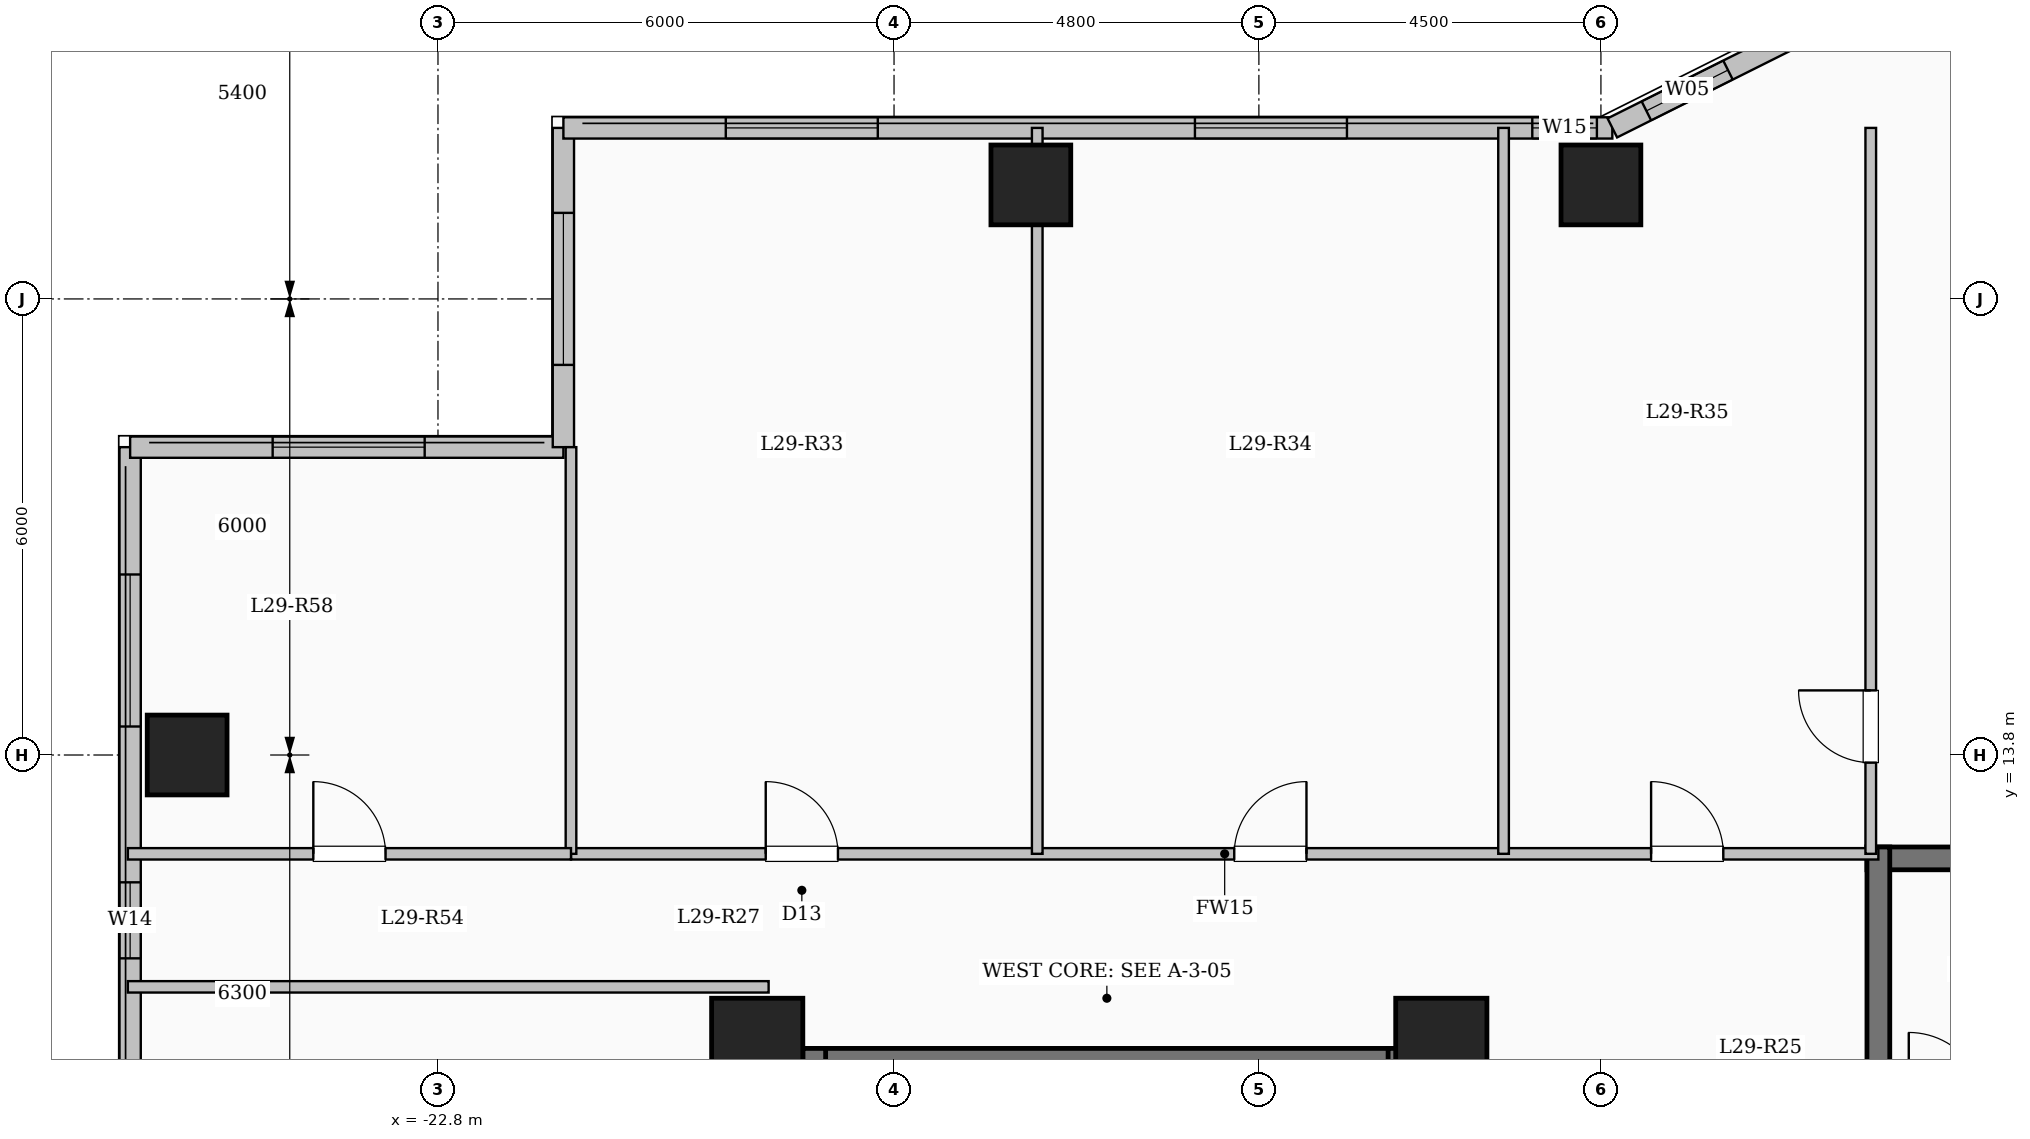
"""IFC4 building model, lengths in metres.
Left out: names, types, materials, properties, quantities, classifications, styles, units other than length and angle.
Written with IfcOpenShell. Run it as: python <this file> out.ifc"""

import sys

from ifc_helpers import new_model, si_unit, direction, frame, frame_2d, origin, origin_2d, place, context, subcontext, project, spatial, rectangle, extrude, element, fill, save


model = new_model("IFC4")
c1 = context("Model", 3, precision=1e-05, world=origin(), true_north=direction((0.0, 1.0)))
c2 = subcontext(c1, "Body", "Model", "MODEL_VIEW")
j1 = project(units=[si_unit("LENGTHUNIT", "METRE"), si_unit("PLANEANGLEUNIT", "RADIAN")], contexts=[c1])
p1 = place(None, origin())
s1 = spatial("IfcSite", under=j1, at=p1, CompositionType="ELEMENT")
p2 = place(p1, origin())
s2 = spatial("IfcBuilding", under=s1, at=p2, CompositionType="ELEMENT")
p3 = place(p2, frame((0.0, 0.0, 108.45)))
s3 = spatial("IfcBuildingStorey", under=s2, at=p3, CompositionType="ELEMENT", Elevation=108.45)
for number, where, z_axis, x_axis in (
    (1, (-9.6, 10.0, 0.0), (0.0, 0.0, 1.0), (1.0, 0.0, 0.0)),
    (2, (-18.6, 10.0, 0.0), (0.0, 0.0, 1.0), (1.0, 0.0, 0.0)),
):
    element("IfcColumn", number, at=place(p3, frame(where, z_axis=z_axis, x_axis=x_axis)), inside=s3, PredefinedType="COLUMN", context=c2, shape_type="SweptSolid", body=[
        extrude(rectangle(XDim=1.2, YDim=1.2, at=origin_2d()), origin(), (0.0, 0.0, 1.0), 3.35),
    ])
for number, where, z_axis, x_axis in (
    (3, (-15.0, 21.3, 0.0), (0.0, 0.0, 1.0), (1.0, 0.0, 0.0)),
    (4, (-7.5, 21.3, 0.0), (0.0, 0.0, 1.0), (1.0, 0.0, 0.0)),
    (5, (-26.1, 13.8, 0.0), (0.0, 0.0, 1.0), (1.0, 0.0, 0.0)),
):
    element("IfcColumn", number, at=place(p3, frame(where, z_axis=z_axis, x_axis=x_axis)), inside=s3, PredefinedType="COLUMN", context=c2, shape_type="SweptSolid", body=[
        extrude(rectangle(XDim=1.05, YDim=1.05, at=origin_2d()), origin(), (0.0, 0.0, 1.0), 3.35),
    ])
p4 = place(p3, frame((-26.85, -17.85, 0.0), z_axis=(0.0, 0.0, 1.0), x_axis=(0.0, 1.0, 0.0)))
e6 = element("IfcWall", 6, at=p4, inside=s3, PredefinedType="SOLIDWALL", context=c2, shape_type="SweptSolid", body=[
    extrude(rectangle(XDim=35.7, YDim=0.28, at=frame_2d((17.85, 0.0))), origin(), (0.0, 0.0, 1.0), 3.1),
])
p5 = place(p4, frame((2.55, 0.0, 0.9)))
e7 = element("IfcOpeningElement", 7, at=p5, cuts=e6, PredefinedType="OPENING", context=c2, shape_type="SweptSolid", body=[
    extrude(rectangle(XDim=2.4, YDim=1.8, at=frame_2d((1.2, 0.9))), frame((0.0, 0.15, 0.0), z_axis=(0.0, -1.0, 0.0), x_axis=(1.0, 0.0, 0.0)), (0.0, 0.0, 1.0), 0.3),
])
p6 = place(p4, frame((8.343, 0.0, 0.9)))
e8 = element("IfcOpeningElement", 8, at=p6, cuts=e6, PredefinedType="OPENING", context=c2, shape_type="SweptSolid", body=[
    extrude(rectangle(XDim=1.5, YDim=1.65, at=frame_2d((0.75, 0.825))), frame((0.0, 0.15, 0.0), z_axis=(0.0, -1.0, 0.0), x_axis=(1.0, 0.0, 0.0)), (0.0, 0.0, 1.0), 0.3),
])
p7 = place(p4, frame((13.75, 0.0, 0.9)))
e9 = element("IfcOpeningElement", 9, at=p7, cuts=e6, PredefinedType="OPENING", context=c2, shape_type="SweptSolid", body=[
    extrude(rectangle(XDim=2.4, YDim=1.8, at=frame_2d((1.2, 0.9))), frame((0.0, 0.15, 0.0), z_axis=(0.0, -1.0, 0.0), x_axis=(1.0, 0.0, 0.0)), (0.0, 0.0, 1.0), 0.3),
])
p8 = place(p4, frame((20.175, 0.0, 0.9)))
e10 = element("IfcOpeningElement", 10, at=p8, cuts=e6, PredefinedType="OPENING", context=c2, shape_type="SweptSolid", body=[
    extrude(rectangle(XDim=1.8, YDim=1.65, at=frame_2d((0.9, 0.825))), frame((0.0, 0.15, 0.0), z_axis=(0.0, -1.0, 0.0), x_axis=(1.0, 0.0, 0.0)), (0.0, 0.0, 1.0), 0.3),
])
p9 = place(p4, frame((24.725, 0.0, 0.9)))
e11 = element("IfcOpeningElement", 11, at=p9, cuts=e6, PredefinedType="OPENING", context=c2, shape_type="SweptSolid", body=[
    extrude(rectangle(XDim=2.0, YDim=1.7, at=frame_2d((1.0, 0.85))), frame((0.0, 0.15, 0.0), z_axis=(0.0, -1.0, 0.0), x_axis=(1.0, 0.0, 0.0)), (0.0, 0.0, 1.0), 0.3),
])
p10 = place(p4, frame((28.975, 0.0, 0.95)))
e12 = element("IfcOpeningElement", 12, at=p10, cuts=e6, PredefinedType="OPENING", context=c2, shape_type="SweptSolid", body=[
    extrude(rectangle(XDim=1.0, YDim=1.5, at=frame_2d((0.5, 0.75))), frame((0.0, 0.15, 0.0), z_axis=(0.0, -1.0, 0.0), x_axis=(1.0, 0.0, 0.0)), (0.0, 0.0, 1.0), 0.3),
])
p11 = place(p4, frame((32.025, 0.0, 0.9)))
e13 = element("IfcOpeningElement", 13, at=p11, cuts=e6, PredefinedType="OPENING", context=c2, shape_type="SweptSolid", body=[
    extrude(rectangle(XDim=2.0, YDim=1.7, at=frame_2d((1.0, 0.85))), frame((0.0, 0.15, 0.0), z_axis=(0.0, -1.0, 0.0), x_axis=(1.0, 0.0, 0.0)), (0.0, 0.0, 1.0), 0.3),
])
p12 = place(p3, frame((-26.85, 17.85, 0.0), z_axis=(0.0, 0.0, 1.0), x_axis=(1.0, 0.0, 0.0)))
e14 = element("IfcWall", 14, at=p12, inside=s3, PredefinedType="SOLIDWALL", context=c2, shape_type="SweptSolid", body=[
    extrude(rectangle(XDim=5.7, YDim=0.28, at=frame_2d((2.85, 0.0))), origin(), (0.0, 0.0, 1.0), 3.1),
])
p13 = place(p12, frame((1.875, 0.0, 0.9)))
e15 = element("IfcOpeningElement", 15, at=p13, cuts=e14, PredefinedType="OPENING", context=c2, shape_type="SweptSolid", body=[
    extrude(rectangle(XDim=2.0, YDim=1.7, at=frame_2d((1.0, 0.85))), frame((0.0, 0.15, 0.0), z_axis=(0.0, -1.0, 0.0), x_axis=(1.0, 0.0, 0.0)), (0.0, 0.0, 1.0), 0.3),
])
p14 = place(p3, frame((-21.15, 17.85, 0.0), z_axis=(0.0, 0.0, 1.0), x_axis=(0.0, 1.0, 0.0)))
e16 = element("IfcWall", 16, at=p14, inside=s3, PredefinedType="SOLIDWALL", context=c2, shape_type="SweptSolid", body=[
    extrude(rectangle(XDim=4.2, YDim=0.28, at=frame_2d((2.1, 0.0))), origin(), (0.0, 0.0, 1.0), 3.1),
])
p15 = place(p14, frame((1.082, 0.0, 0.9)))
e17 = element("IfcOpeningElement", 17, at=p15, cuts=e16, PredefinedType="OPENING", context=c2, shape_type="SweptSolid", body=[
    extrude(rectangle(XDim=2.0, YDim=1.7, at=frame_2d((1.0, 0.85))), frame((0.0, 0.15, 0.0), z_axis=(0.0, -1.0, 0.0), x_axis=(1.0, 0.0, 0.0)), (0.0, 0.0, 1.0), 0.3),
])
p16 = place(p3, frame((-21.15, 22.05, 0.0), z_axis=(0.0, 0.0, 1.0), x_axis=(1.0, 0.0, 0.0)))
e18 = element("IfcWall", 18, at=p16, inside=s3, PredefinedType="SOLIDWALL", context=c2, shape_type="SweptSolid", body=[
    extrude(rectangle(XDim=13.8, YDim=0.28, at=frame_2d((6.9, 0.0))), origin(), (0.0, 0.0, 1.0), 3.1),
])
p17 = place(p16, frame((2.136, 0.0, 0.9)))
e19 = element("IfcOpeningElement", 19, at=p17, cuts=e18, PredefinedType="OPENING", context=c2, shape_type="SweptSolid", body=[
    extrude(rectangle(XDim=2.0, YDim=1.7, at=frame_2d((1.0, 0.85))), frame((0.0, 0.15, 0.0), z_axis=(0.0, -1.0, 0.0), x_axis=(1.0, 0.0, 0.0)), (0.0, 0.0, 1.0), 0.3),
])
p18 = place(p16, frame((8.309, 0.0, 0.9)))
e20 = element("IfcOpeningElement", 20, at=p18, cuts=e18, PredefinedType="OPENING", context=c2, shape_type="SweptSolid", body=[
    extrude(rectangle(XDim=2.0, YDim=1.7, at=frame_2d((1.0, 0.85))), frame((0.0, 0.15, 0.0), z_axis=(0.0, -1.0, 0.0), x_axis=(1.0, 0.0, 0.0)), (0.0, 0.0, 1.0), 0.3),
])
p19 = place(p16, frame((12.747, 0.0, 0.95)))
e21 = element("IfcOpeningElement", 21, at=p19, cuts=e18, PredefinedType="OPENING", context=c2, shape_type="SweptSolid", body=[
    extrude(rectangle(XDim=0.85, YDim=1.5, at=frame_2d((0.425, 0.75))), frame((0.0, 0.15, 0.0), z_axis=(0.0, -1.0, 0.0), x_axis=(1.0, 0.0, 0.0)), (0.0, 0.0, 1.0), 0.3),
])
p20 = place(p3, frame((-7.35, 22.05, 0.0), z_axis=(0.0, 0.0, 1.0), x_axis=(0.894427191, 0.4472135955, 0.0)))
e22 = element("IfcWall", 22, at=p20, inside=s3, PredefinedType="SOLIDWALL", context=c2, shape_type="SweptSolid", body=[
    extrude(rectangle(XDim=3.354, YDim=0.28, at=frame_2d((1.677, 0.0))), origin(), (0.0, 0.0, 1.0), 3.1),
])
p21 = place(p20, frame((0.501, 0.0, 0.95)))
e23 = element("IfcOpeningElement", 23, at=p21, cuts=e22, PredefinedType="OPENING", context=c2, shape_type="SweptSolid", body=[
    extrude(rectangle(XDim=1.2, YDim=1.5, at=frame_2d((0.6, 0.75))), frame((0.0, 0.15, 0.0), z_axis=(0.0, -1.0, 0.0), x_axis=(1.0, 0.0, 0.0)), (0.0, 0.0, 1.0), 0.3),
])
p22 = place(p3, frame((-18.0, 9.79, 0.0), z_axis=(0.0, 0.0, 1.0), x_axis=(1.0, 0.0, 0.0)))
e24 = element("IfcWall", 24, at=p22, inside=s3, PredefinedType="SHEAR", context=c2, shape_type="SweptSolid", body=[
    extrude(rectangle(XDim=8.0, YDim=0.3, at=frame_2d((4.0, 0.0))), origin(), (0.0, 0.0, 1.0), 3.35),
])
for number, where, z_axis, x_axis in (
    (25, (-17.85, 6.35, 0.0), (0.0, 0.0, 1.0), (0.0, 1.0, 0.0)),
    (26, (-10.15, 6.35, 0.0), (0.0, 0.0, 1.0), (0.0, 1.0, 0.0)),
):
    element("IfcWall", number, at=place(p3, frame(where, z_axis=z_axis, x_axis=x_axis)), inside=s3, PredefinedType="SHEAR", context=c2, shape_type="SweptSolid", body=[
        extrude(rectangle(XDim=3.59, YDim=0.3, at=frame_2d((1.795, 0.0))), origin(), (0.0, 0.0, 1.0), 3.35),
    ])
p23 = place(p3, frame((-4.0, 12.44, 0.0), z_axis=(0.0, 0.0, 1.0), x_axis=(1.0, 0.0, 0.0)))
e27 = element("IfcWall", 27, at=p23, inside=s3, PredefinedType="SHEAR", context=c2, shape_type="SweptSolid", body=[
    extrude(rectangle(XDim=8.0, YDim=0.3, at=frame_2d((4.0, 0.0))), origin(), (0.0, 0.0, 1.0), 3.35),
])
p24 = place(p3, frame((-3.85, 9.0, 0.0), z_axis=(0.0, 0.0, 1.0), x_axis=(0.0, 1.0, 0.0)))
e28 = element("IfcWall", 28, at=p24, inside=s3, PredefinedType="SHEAR", context=c2, shape_type="SweptSolid", body=[
    extrude(rectangle(XDim=3.59, YDim=0.3, at=frame_2d((1.795, 0.0))), origin(), (0.0, 0.0, 1.0), 3.35),
])
p25 = place(p3, frame((-21.05, 12.5, 0.0), z_axis=(0.0, 0.0, 1.0), x_axis=(1.0, 0.0, 0.0)))
e29 = element("IfcWall", 29, at=p25, inside=s3, PredefinedType="PARTITIONING", context=c2, shape_type="SweptSolid", body=[
    extrude(rectangle(XDim=17.2, YDim=0.15, at=frame_2d((8.6, 0.0))), origin(), (0.0, 0.0, 1.0), 3.1),
])
p26 = place(p25, frame((2.562, 0.0, 0.0)))
e30 = element("IfcOpeningElement", 30, at=p26, cuts=e29, PredefinedType="OPENING", context=c2, shape_type="SweptSolid", body=[
    extrude(rectangle(XDim=0.95, YDim=2.15, at=frame_2d((0.475, 1.075))), frame((0.0, 0.085, 0.0), z_axis=(0.0, -1.0, 0.0), x_axis=(1.0, 0.0, 0.0)), (0.0, 0.0, 1.0), 0.17),
])
p27 = place(p25, frame((8.726, 0.0, 0.0)))
e31 = element("IfcOpeningElement", 31, at=p27, cuts=e29, PredefinedType="OPENING", context=c2, shape_type="SweptSolid", body=[
    extrude(rectangle(XDim=0.95, YDim=2.15, at=frame_2d((0.475, 1.075))), frame((0.0, 0.085, 0.0), z_axis=(0.0, -1.0, 0.0), x_axis=(1.0, 0.0, 0.0)), (0.0, 0.0, 1.0), 0.17),
])
p28 = place(p25, frame((14.21, 0.0, 0.0)))
e32 = element("IfcOpeningElement", 32, at=p28, cuts=e29, PredefinedType="OPENING", context=c2, shape_type="SweptSolid", body=[
    extrude(rectangle(XDim=0.95, YDim=2.15, at=frame_2d((0.475, 1.075))), frame((0.0, 0.085, 0.0), z_axis=(0.0, -1.0, 0.0), x_axis=(1.0, 0.0, 0.0)), (0.0, 0.0, 1.0), 0.17),
])
p29 = place(p3, frame((-3.95, 12.5, 0.0), z_axis=(0.0, 0.0, 1.0), x_axis=(0.0, 1.0, 0.0)))
e33 = element("IfcWall", 33, at=p29, inside=s3, PredefinedType="PARTITIONING", context=c2, shape_type="SweptSolid", body=[
    extrude(rectangle(XDim=9.55, YDim=0.14, at=frame_2d((4.775, 0.0))), origin(), (0.0, 0.0, 1.0), 3.1),
])
p30 = place(p29, frame((1.2, 0.0, 0.0)))
e34 = element("IfcOpeningElement", 34, at=p30, cuts=e33, PredefinedType="OPENING", context=c2, shape_type="SweptSolid", body=[
    extrude(rectangle(XDim=0.95, YDim=2.15, at=frame_2d((0.475, 1.075))), frame((0.0, 0.08, 0.0), z_axis=(0.0, -1.0, 0.0), x_axis=(1.0, 0.0, 0.0)), (0.0, 0.0, 1.0), 0.16),
])
p31 = place(p3, frame((-14.916, 12.5, 0.0), z_axis=(0.0, 0.0, 1.0), x_axis=(0.0, 1.0, 0.0)))
e35 = element("IfcWall", 35, at=p31, inside=s3, PredefinedType="PARTITIONING", context=c2, shape_type="SweptSolid", body=[
    extrude(rectangle(XDim=9.55, YDim=0.14, at=frame_2d((4.775, 0.0))), origin(), (0.0, 0.0, 1.0), 2.435),
])
p32 = place(p3, frame((-8.781, 12.5, 0.0), z_axis=(0.0, 0.0, 1.0), x_axis=(0.0, 1.0, 0.0)))
e36 = element("IfcWall", 36, at=p32, inside=s3, PredefinedType="PARTITIONING", context=c2, shape_type="SweptSolid", body=[
    extrude(rectangle(XDim=9.55, YDim=0.14, at=frame_2d((4.775, 0.0))), origin(), (0.0, 0.0, 1.0), 3.1),
])
p33 = place(p3, frame((-26.88, 10.75, 0.0), z_axis=(0.0, 0.0, 1.0), x_axis=(1.0, 0.0, 0.0)))
e37 = element("IfcWall", 37, at=p33, inside=s3, PredefinedType="PARTITIONING", context=c2, shape_type="SweptSolid", body=[
    extrude(rectangle(XDim=8.43, YDim=0.15, at=frame_2d((4.215, 0.0))), origin(), (0.0, 0.0, 1.0), 3.1),
])
p34 = place(p3, frame((-21.05, 12.5, 0.0), z_axis=(0.0, 0.0, 1.0), x_axis=(0.0, 1.0, 0.0)))
e38 = element("IfcWall", 38, at=p34, inside=s3, PredefinedType="PARTITIONING", context=c2, shape_type="SweptSolid", body=[
    extrude(rectangle(XDim=5.35, YDim=0.14, at=frame_2d((2.675, 0.0))), origin(), (0.0, 0.0, 1.0), 3.1),
])
p35 = place(p3, frame((-26.88, 12.5, 0.0), z_axis=(0.0, 0.0, 1.0), x_axis=(1.0, 0.0, 0.0)))
e39 = element("IfcWall", 39, at=p35, inside=s3, PredefinedType="PARTITIONING", context=c2, shape_type="SweptSolid", body=[
    extrude(rectangle(XDim=5.83, YDim=0.15, at=frame_2d((2.915, 0.0))), origin(), (0.0, 0.0, 1.0), 3.1),
])
p36 = place(p35, frame((2.44, 0.0, 0.0)))
e40 = element("IfcOpeningElement", 40, at=p36, cuts=e39, PredefinedType="OPENING", context=c2, shape_type="SweptSolid", body=[
    extrude(rectangle(XDim=0.95, YDim=2.15, at=frame_2d((0.475, 1.075))), frame((0.0, 0.085, 0.0), z_axis=(0.0, -1.0, 0.0), x_axis=(1.0, 0.0, 0.0)), (0.0, 0.0, 1.0), 0.17),
])
p37 = place(p10, origin())
e41 = element("IfcWindow", 41, at=p37, inside=s3, PartitioningType="SINGLE_PANEL", PredefinedType="WINDOW", context=c2, shape_type="SweptSolid", body=[
    extrude(rectangle(XDim=1.0, YDim=1.5, at=frame_2d((0.5, 0.75))), frame((0.0, 0.03, 0.0), z_axis=(0.0, -1.0, 0.0), x_axis=(1.0, 0.0, 0.0)), (0.0, 0.0, 1.0), 0.06),
])
fill(e12, e41)
p38 = place(p11, origin())
e42 = element("IfcWindow", 42, at=p38, inside=s3, PartitioningType="SINGLE_PANEL", PredefinedType="WINDOW", context=c2, shape_type="SweptSolid", body=[
    extrude(rectangle(XDim=2.0, YDim=1.7, at=frame_2d((1.0, 0.85))), frame((0.0, 0.03, 0.0), z_axis=(0.0, -1.0, 0.0), x_axis=(1.0, 0.0, 0.0)), (0.0, 0.0, 1.0), 0.06),
])
fill(e13, e42)
p39 = place(p13, origin())
e43 = element("IfcWindow", 43, at=p39, inside=s3, PartitioningType="SINGLE_PANEL", PredefinedType="WINDOW", context=c2, shape_type="SweptSolid", body=[
    extrude(rectangle(XDim=2.0, YDim=1.7, at=frame_2d((1.0, 0.85))), frame((0.0, 0.03, 0.0), z_axis=(0.0, -1.0, 0.0), x_axis=(1.0, 0.0, 0.0)), (0.0, 0.0, 1.0), 0.06),
])
fill(e15, e43)
p40 = place(p15, origin())
e44 = element("IfcWindow", 44, at=p40, inside=s3, PartitioningType="SINGLE_PANEL", PredefinedType="WINDOW", context=c2, shape_type="SweptSolid", body=[
    extrude(rectangle(XDim=2.0, YDim=1.7, at=frame_2d((1.0, 0.85))), frame((0.0, 0.03, 0.0), z_axis=(0.0, -1.0, 0.0), x_axis=(1.0, 0.0, 0.0)), (0.0, 0.0, 1.0), 0.06),
])
fill(e17, e44)
p41 = place(p17, origin())
e45 = element("IfcWindow", 45, at=p41, inside=s3, PartitioningType="SINGLE_PANEL", PredefinedType="WINDOW", context=c2, shape_type="SweptSolid", body=[
    extrude(rectangle(XDim=2.0, YDim=1.7, at=frame_2d((1.0, 0.85))), frame((0.0, 0.03, 0.0), z_axis=(0.0, -1.0, 0.0), x_axis=(1.0, 0.0, 0.0)), (0.0, 0.0, 1.0), 0.06),
])
fill(e19, e45)
p42 = place(p18, origin())
e46 = element("IfcWindow", 46, at=p42, inside=s3, PartitioningType="SINGLE_PANEL", PredefinedType="WINDOW", context=c2, shape_type="SweptSolid", body=[
    extrude(rectangle(XDim=2.0, YDim=1.7, at=frame_2d((1.0, 0.85))), frame((0.0, 0.03, 0.0), z_axis=(0.0, -1.0, 0.0), x_axis=(1.0, 0.0, 0.0)), (0.0, 0.0, 1.0), 0.06),
])
fill(e20, e46)
p43 = place(p19, origin())
e47 = element("IfcWindow", 47, at=p43, inside=s3, PartitioningType="SINGLE_PANEL", PredefinedType="WINDOW", context=c2, shape_type="SweptSolid", body=[
    extrude(rectangle(XDim=0.85, YDim=1.5, at=frame_2d((0.425, 0.75))), frame((0.0, 0.03, 0.0), z_axis=(0.0, -1.0, 0.0), x_axis=(1.0, 0.0, 0.0)), (0.0, 0.0, 1.0), 0.06),
])
fill(e21, e47)
p44 = place(p21, origin())
e48 = element("IfcWindow", 48, at=p44, inside=s3, PartitioningType="SINGLE_PANEL", PredefinedType="WINDOW", context=c2, shape_type="SweptSolid", body=[
    extrude(rectangle(XDim=1.2, YDim=1.5, at=frame_2d((0.6, 0.75))), frame((0.0, 0.03, 0.0), z_axis=(0.0, -1.0, 0.0), x_axis=(1.0, 0.0, 0.0)), (0.0, 0.0, 1.0), 0.06),
])
fill(e23, e48)
p45 = place(p26, origin())
e49 = element("IfcDoor", 49, at=p45, inside=s3, OperationType="SINGLE_SWING_LEFT", PredefinedType="DOOR", context=c2, shape_type="SweptSolid", body=[
    extrude(rectangle(XDim=0.95, YDim=2.15, at=frame_2d((0.475, 1.075))), frame((0.0, 0.025, 0.0), z_axis=(0.0, -1.0, 0.0), x_axis=(1.0, 0.0, 0.0)), (0.0, 0.0, 1.0), 0.05),
])
fill(e30, e49)
p46 = place(p27, origin())
e50 = element("IfcDoor", 50, at=p46, inside=s3, OperationType="SINGLE_SWING_RIGHT", PredefinedType="DOOR", context=c2, shape_type="SweptSolid", body=[
    extrude(rectangle(XDim=0.95, YDim=2.15, at=frame_2d((0.475, 1.075))), frame((0.0, 0.025, 0.0), z_axis=(0.0, -1.0, 0.0), x_axis=(1.0, 0.0, 0.0)), (0.0, 0.0, 1.0), 0.05),
])
fill(e31, e50)
p47 = place(p28, origin())
e51 = element("IfcDoor", 51, at=p47, inside=s3, OperationType="SINGLE_SWING_LEFT", PredefinedType="DOOR", context=c2, shape_type="SweptSolid", body=[
    extrude(rectangle(XDim=0.95, YDim=2.15, at=frame_2d((0.475, 1.075))), frame((0.0, 0.025, 0.0), z_axis=(0.0, -1.0, 0.0), x_axis=(1.0, 0.0, 0.0)), (0.0, 0.0, 1.0), 0.05),
])
fill(e32, e51)
p48 = place(p30, origin())
e52 = element("IfcDoor", 52, at=p48, inside=s3, OperationType="SINGLE_SWING_RIGHT", PredefinedType="DOOR", context=c2, shape_type="SweptSolid", body=[
    extrude(rectangle(XDim=0.95, YDim=2.15, at=frame_2d((0.475, 1.075))), frame((0.0, 0.025, 0.0), z_axis=(0.0, -1.0, 0.0), x_axis=(1.0, 0.0, 0.0)), (0.0, 0.0, 1.0), 0.05),
])
fill(e34, e52)
p49 = place(p36, origin())
e53 = element("IfcDoor", 53, at=p49, inside=s3, OperationType="SINGLE_SWING_LEFT", PredefinedType="DOOR", context=c2, shape_type="SweptSolid", body=[
    extrude(rectangle(XDim=0.95, YDim=2.15, at=frame_2d((0.475, 1.075))), frame((0.0, 0.025, 0.0), z_axis=(0.0, -1.0, 0.0), x_axis=(1.0, 0.0, 0.0)), (0.0, 0.0, 1.0), 0.05),
])
fill(e40, e53)
save(model, sys.argv[1])
